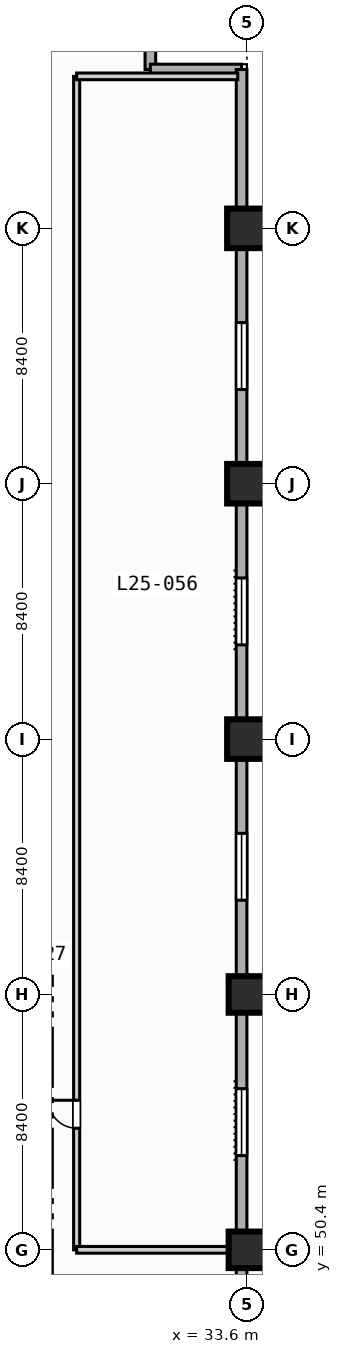
"""IFC4 building model, lengths in metres.
Left out: names, types, materials, properties, quantities, classifications, styles, units other than length and angle.
Written with IfcOpenShell. Run it as: python <this file> out.ifc"""

import sys

from ifc_helpers import new_model, si_unit, direction, frame, frame_2d, origin, origin_2d, place, context, subcontext, project, spatial, rectangle, extrude, element, fill, save


model = new_model("IFC4")
c1 = context("Model", 3, precision=1e-05, world=origin(), true_north=direction((0.0, 1.0)))
c2 = subcontext(c1, "Body", "Model", "MODEL_VIEW")
j1 = project(units=[si_unit("LENGTHUNIT", "METRE"), si_unit("PLANEANGLEUNIT", "RADIAN")], contexts=[c1])
p1 = place(None, origin())
s1 = spatial("IfcSite", under=j1, at=p1, CompositionType="ELEMENT")
p2 = place(p1, origin())
s2 = spatial("IfcBuilding", under=s1, at=p2, CompositionType="ELEMENT")
p3 = place(p2, frame((0.0, 0.0, 107.6)))
s3 = spatial("IfcBuildingStorey", under=s2, at=p3, CompositionType="ELEMENT", Elevation=107.6)
for number, where, z_axis, x_axis in (
    (1, (33.6, 50.4, 0.0), (0.0, 0.0, 1.0), (1.0, 0.0, 0.0)),
    (2, (33.6, 58.8, 0.0), (0.0, 0.0, 1.0), (1.0, 0.0, 0.0)),
):
    element("IfcColumn", number, at=place(p3, frame(where, z_axis=z_axis, x_axis=x_axis)), inside=s3, PredefinedType="COLUMN", context=c2, shape_type="SweptSolid", body=[
        extrude(rectangle(XDim=1.2, YDim=1.2, at=origin_2d()), origin(), (0.0, 0.0, 1.0), 3.8),
    ])
for number, where, z_axis, x_axis in (
    (3, (33.6, 67.2, 0.0), (0.0, 0.0, 1.0), (1.0, 0.0, 0.0)),
    (4, (33.6, 75.6, 0.0), (0.0, 0.0, 1.0), (1.0, 0.0, 0.0)),
    (5, (33.6, 84.0, 0.0), (0.0, 0.0, 1.0), (1.0, 0.0, 0.0)),
):
    element("IfcColumn", number, at=place(p3, frame(where, z_axis=z_axis, x_axis=x_axis)), inside=s3, PredefinedType="COLUMN", context=c2, shape_type="SweptSolid", body=[
        extrude(rectangle(XDim=1.3, YDim=1.3, at=origin_2d()), origin(), (0.0, 0.0, 1.0), 3.8),
    ])
for number, where, z_axis, x_axis in (
    (6, (30.425, 92.225, 0.0), (0.0, 0.0, 1.0), (0.0, -1.0, 0.0)),
    (7, (30.425, 89.225, 0.0), (0.0, 0.0, 1.0), (1.0, 0.0, 0.0)),
):
    element("IfcWall", number, at=place(p3, frame(where, z_axis=z_axis, x_axis=x_axis)), inside=s3, PredefinedType="STANDARD", context=c2, shape_type="SweptSolid", body=[
        extrude(rectangle(XDim=3.0, YDim=0.35, at=frame_2d((1.5, 0.0))), origin(), (0.0, 0.0, 1.0), 3.55),
    ])
p4 = place(p3, frame((33.425, 89.225, 0.0), z_axis=(0.0, 0.0, 1.0), x_axis=(0.0, -1.0, 0.0)))
e8 = element("IfcWall", 8, at=p4, inside=s3, PredefinedType="STANDARD", context=c2, shape_type="SweptSolid", body=[
    extrude(rectangle(XDim=55.8, YDim=0.35, at=frame_2d((27.9, 0.0))), origin(), (0.0, 0.0, 1.0), 3.55),
])
p5 = place(p4, frame((50.325, 0.0, 0.85)))
e9 = element("IfcOpeningElement", 9, at=p5, cuts=e8, PredefinedType="OPENING", context=c2, shape_type="SweptSolid", body=[
    extrude(rectangle(XDim=2.2, YDim=1.8, at=frame_2d((1.1, 0.9))), frame((0.0, 0.185, 0.0), z_axis=(0.0, -1.0, 0.0), x_axis=(1.0, 0.0, 0.0)), (0.0, 0.0, 1.0), 0.37),
])
p6 = place(p4, frame((33.525, 0.0, 0.85)))
e10 = element("IfcOpeningElement", 10, at=p6, cuts=e8, PredefinedType="OPENING", context=c2, shape_type="SweptSolid", body=[
    extrude(rectangle(XDim=2.2, YDim=1.8, at=frame_2d((1.1, 0.9))), frame((0.0, 0.185, 0.0), z_axis=(0.0, -1.0, 0.0), x_axis=(1.0, 0.0, 0.0)), (0.0, 0.0, 1.0), 0.37),
])
p7 = place(p4, frame((25.125, 0.0, 0.85)))
e11 = element("IfcOpeningElement", 11, at=p7, cuts=e8, PredefinedType="OPENING", context=c2, shape_type="SweptSolid", body=[
    extrude(rectangle(XDim=2.2, YDim=1.8, at=frame_2d((1.1, 0.9))), frame((0.0, 0.185, 0.0), z_axis=(0.0, -1.0, 0.0), x_axis=(1.0, 0.0, 0.0)), (0.0, 0.0, 1.0), 0.37),
])
p8 = place(p4, frame((16.725, 0.0, 0.85)))
e12 = element("IfcOpeningElement", 12, at=p8, cuts=e8, PredefinedType="OPENING", context=c2, shape_type="SweptSolid", body=[
    extrude(rectangle(XDim=2.2, YDim=1.8, at=frame_2d((1.1, 0.9))), frame((0.0, 0.185, 0.0), z_axis=(0.0, -1.0, 0.0), x_axis=(1.0, 0.0, 0.0)), (0.0, 0.0, 1.0), 0.37),
])
p9 = place(p4, frame((8.325, 0.0, 0.85)))
e13 = element("IfcOpeningElement", 13, at=p9, cuts=e8, PredefinedType="OPENING", context=c2, shape_type="SweptSolid", body=[
    extrude(rectangle(XDim=2.2, YDim=1.8, at=frame_2d((1.1, 0.9))), frame((0.0, 0.185, 0.0), z_axis=(0.0, -1.0, 0.0), x_axis=(1.0, 0.0, 0.0)), (0.0, 0.0, 1.0), 0.37),
])
p10 = place(p3, frame((28.0, 50.4, 0.0), z_axis=(0.0, 0.0, 1.0), x_axis=(0.0, 1.0, 0.0)))
e14 = element("IfcWall", 14, at=p10, inside=s3, PredefinedType="PARTITIONING", context=c2, shape_type="SweptSolid", body=[
    extrude(rectangle(XDim=38.6, YDim=0.2, at=frame_2d((19.3, 0.0))), origin(), (0.0, 0.0, 1.0), 3.55),
])
p11 = place(p10, frame((4.0, 0.0, 0.0)))
e15 = element("IfcOpeningElement", 15, at=p11, cuts=e14, PredefinedType="OPENING", context=c2, shape_type="SweptSolid", body=[
    extrude(rectangle(XDim=0.92, YDim=2.1, at=frame_2d((0.46, 1.05))), frame((0.0, 0.11, 0.0), z_axis=(0.0, -1.0, 0.0), x_axis=(1.0, 0.0, 0.0)), (0.0, 0.0, 1.0), 0.22),
])
p12 = place(p3, frame((28.0, 50.4, 0.0), z_axis=(0.0, 0.0, 1.0), x_axis=(1.0, 0.0, 0.0)))
e16 = element("IfcWall", 16, at=p12, inside=s3, PredefinedType="PARTITIONING", context=c2, shape_type="SweptSolid", body=[
    extrude(rectangle(XDim=5.3, YDim=0.22, at=frame_2d((2.65, 0.0))), origin(), (0.0, 0.0, 1.0), 2.8),
])
p13 = place(p3, frame((28.0, 89.0, 0.0), z_axis=(0.0, 0.0, 1.0), x_axis=(1.0, 0.0, 0.0)))
e17 = element("IfcWall", 17, at=p13, inside=s3, PredefinedType="PARTITIONING", context=c2, shape_type="SweptSolid", body=[
    extrude(rectangle(XDim=5.3, YDim=0.22, at=frame_2d((2.65, 0.0))), origin(), (0.0, 0.0, 1.0), 3.55),
])
p14 = place(p6, origin())
e18 = element("IfcWindow", 18, at=p14, inside=s3, PartitioningType="SINGLE_PANEL", PredefinedType="WINDOW", context=c2, shape_type="SweptSolid", body=[
    extrude(rectangle(XDim=2.2, YDim=1.8, at=frame_2d((1.1, 0.9))), frame((0.0, 0.03, 0.0), z_axis=(0.0, -1.0, 0.0), x_axis=(1.0, 0.0, 0.0)), (0.0, 0.0, 1.0), 0.06),
])
fill(e10, e18)
p15 = place(p7, origin())
e19 = element("IfcWindow", 19, at=p15, inside=s3, PartitioningType="SINGLE_PANEL", PredefinedType="WINDOW", context=c2, shape_type="SweptSolid", body=[
    extrude(rectangle(XDim=2.2, YDim=1.8, at=frame_2d((1.1, 0.9))), frame((0.0, 0.03, 0.0), z_axis=(0.0, -1.0, 0.0), x_axis=(1.0, 0.0, 0.0)), (0.0, 0.0, 1.0), 0.06),
])
fill(e11, e19)
p16 = place(p8, origin())
e20 = element("IfcWindow", 20, at=p16, inside=s3, PartitioningType="SINGLE_PANEL", PredefinedType="WINDOW", context=c2, shape_type="SweptSolid", body=[
    extrude(rectangle(XDim=2.2, YDim=1.8, at=frame_2d((1.1, 0.9))), frame((0.0, 0.03, 0.0), z_axis=(0.0, -1.0, 0.0), x_axis=(1.0, 0.0, 0.0)), (0.0, 0.0, 1.0), 0.06),
])
fill(e12, e20)
p17 = place(p9, origin())
e21 = element("IfcWindow", 21, at=p17, inside=s3, PartitioningType="SINGLE_PANEL", PredefinedType="WINDOW", context=c2, shape_type="SweptSolid", body=[
    extrude(rectangle(XDim=2.2, YDim=1.8, at=frame_2d((1.1, 0.9))), frame((0.0, 0.03, 0.0), z_axis=(0.0, -1.0, 0.0), x_axis=(1.0, 0.0, 0.0)), (0.0, 0.0, 1.0), 0.06),
])
fill(e13, e21)
p18 = place(p11, origin())
e22 = element("IfcDoor", 22, at=p18, inside=s3, OperationType="SINGLE_SWING_RIGHT", PredefinedType="DOOR", context=c2, shape_type="SweptSolid", body=[
    extrude(rectangle(XDim=0.92, YDim=2.1, at=frame_2d((0.46, 1.05))), frame((0.0, 0.025, 0.0), z_axis=(0.0, -1.0, 0.0), x_axis=(1.0, 0.0, 0.0)), (0.0, 0.0, 1.0), 0.05),
])
fill(e15, e22)
save(model, sys.argv[1])
